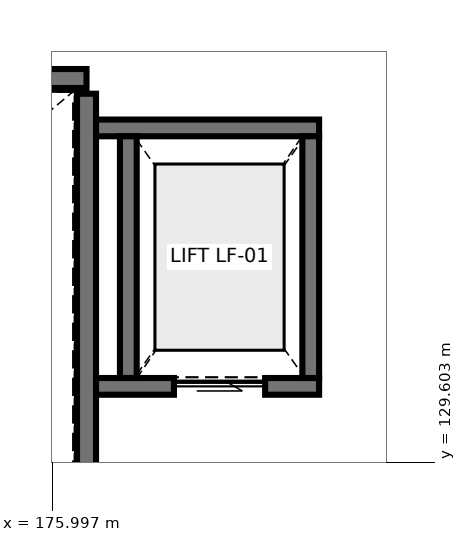
"""IFC4 building model, lengths in metres.
Left out: names, types, materials, properties, quantities, classifications, styles, units other than length and angle.
Written with IfcOpenShell. Run it as: python <this file> out.ifc"""

import sys

from ifc_helpers import new_model, si_unit, direction, frame, frame_2d, origin, place, context, subcontext, project, spatial, rectangle, extrude, element, fill, save


model = new_model("IFC4")
c1 = context("Model", 3, precision=1e-05, world=origin(), true_north=direction((0.0, 1.0)))
c2 = subcontext(c1, "Body", "Model", "MODEL_VIEW")
j1 = project(units=[si_unit("LENGTHUNIT", "METRE"), si_unit("PLANEANGLEUNIT", "RADIAN")], contexts=[c1])
p1 = place(None, origin())
s1 = spatial("IfcSite", under=j1, at=p1, CompositionType="ELEMENT")
p2 = place(p1, origin())
s2 = spatial("IfcBuilding", under=s1, at=p2, CompositionType="ELEMENT")
p3 = place(p2, frame((0.0, 0.0, 5.4)))
s3 = spatial("IfcBuildingStorey", under=s2, at=p3, CompositionType="ELEMENT", Elevation=5.4)
p4 = place(p3, frame((168.15, 134.65, 0.0), z_axis=(0.0, 0.0, 1.0), x_axis=(1.0, 0.0, 0.0)))
e1 = element("IfcWall", 1, at=p4, inside=s3, PredefinedType="SHEAR", context=c2, shape_type="SweptSolid", body=[
    extrude(rectangle(XDim=8.3, YDim=0.25, at=frame_2d((4.15, 0.0))), origin(), (0.0, 0.0, 1.0), 4.53),
])
p5 = place(p3, frame((176.45, 134.45, 0.0), z_axis=(0.0, 0.0, 1.0), x_axis=(0.0, -1.0, 0.0)))
e2 = element("IfcWall", 2, at=p5, inside=s3, PredefinedType="SHEAR", context=c2, shape_type="SweptSolid", body=[
    extrude(rectangle(XDim=5.3, YDim=0.25, at=frame_2d((2.65, 0.0))), origin(), (0.0, 0.0, 1.0), 4.53),
])
p6 = place(p3, frame((176.575, 130.6, 0.0), z_axis=(0.0, 0.0, 1.0), x_axis=(1.0, 0.0, 0.0)))
e3 = element("IfcWall", 3, at=p6, inside=s3, PredefinedType="SHEAR", context=c2, shape_type="SweptSolid", body=[
    extrude(rectangle(XDim=2.935, YDim=0.22, at=frame_2d((1.468, 0.0))), origin(), (0.0, 0.0, 1.0), 4.53),
])
p7 = place(p6, frame((1.025, 0.0, 0.0)))
e4 = element("IfcOpeningElement", 4, at=p7, cuts=e3, PredefinedType="OPENING", context=c2, shape_type="SweptSolid", body=[
    extrude(rectangle(XDim=1.2, YDim=2.25, at=frame_2d((0.6, 1.125))), frame((0.0, 0.12, 0.0), z_axis=(0.0, -1.0, 0.0), x_axis=(1.0, 0.0, 0.0)), (0.0, 0.0, 1.0), 0.24),
])
p8 = place(p3, frame((176.575, 134.0, 0.0), z_axis=(0.0, 0.0, 1.0), x_axis=(1.0, 0.0, 0.0)))
e5 = element("IfcWall", 5, at=p8, inside=s3, PredefinedType="SHEAR", context=c2, shape_type="SweptSolid", body=[
    extrude(rectangle(XDim=2.935, YDim=0.22, at=frame_2d((1.468, 0.0))), origin(), (0.0, 0.0, 1.0), 4.53),
])
for number, where, z_axis, x_axis in (
    (6, (177.0, 130.71, 0.0), (0.0, 0.0, 1.0), (0.0, 1.0, 0.0)),
    (7, (179.4, 130.71, 0.0), (0.0, 0.0, 1.0), (0.0, 1.0, 0.0)),
):
    element("IfcWall", number, at=place(p3, frame(where, z_axis=z_axis, x_axis=x_axis)), inside=s3, PredefinedType="SHEAR", context=c2, shape_type="SweptSolid", body=[
        extrude(rectangle(XDim=3.18, YDim=0.22, at=frame_2d((1.59, 0.0))), origin(), (0.0, 0.0, 1.0), 4.53),
    ])
p9 = place(p7, origin())
e8 = element("IfcDoor", 8, at=p9, inside=s3, OperationType="SLIDING_TO_LEFT", PredefinedType="DOOR", context=c2, shape_type="SweptSolid", body=[
    extrude(rectangle(XDim=1.2, YDim=2.25, at=frame_2d((0.6, 1.125))), frame((0.0, 0.025, 0.0), z_axis=(0.0, -1.0, 0.0), x_axis=(1.0, 0.0, 0.0)), (0.0, 0.0, 1.0), 0.05),
])
fill(e4, e8)
save(model, sys.argv[1])
